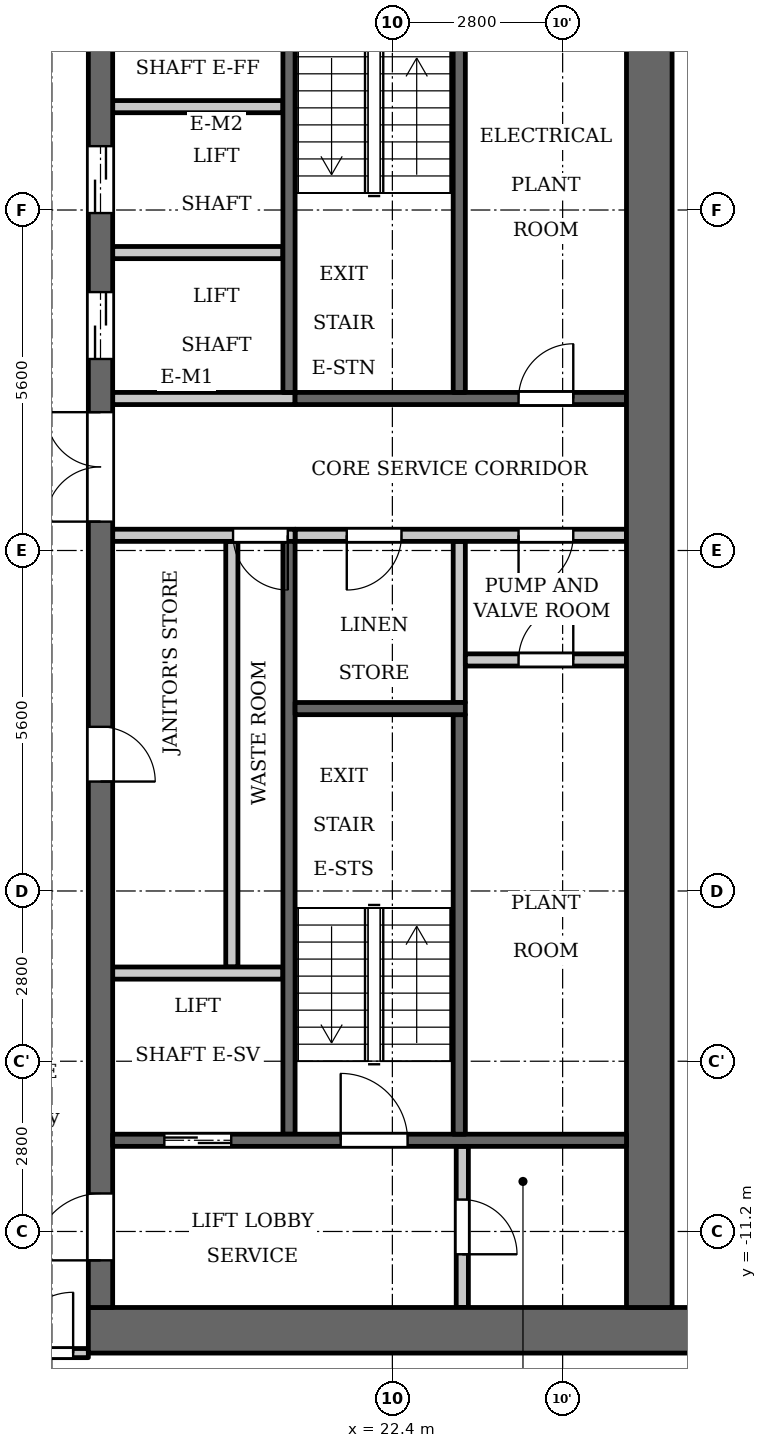
"""IFC4 building model, lengths in metres.
Left out: names, types, materials, properties, quantities, classifications, styles, units other than length and angle.
Written with IfcOpenShell. Run it as: python <this file> out.ifc"""

import sys

from ifc_helpers import new_model, si_unit, direction, frame, frame_2d, origin, place, context, subcontext, project, spatial, rectangle, extrude, element, fill, save


model = new_model("IFC4")
c1 = context("Model", 3, precision=1e-05, world=origin(), true_north=direction((0.0, 1.0)))
c2 = subcontext(c1, "Body", "Model", "MODEL_VIEW")
j1 = project(units=[si_unit("LENGTHUNIT", "METRE"), si_unit("PLANEANGLEUNIT", "RADIAN")], contexts=[c1])
p1 = place(None, origin())
s1 = spatial("IfcSite", under=j1, at=p1, CompositionType="ELEMENT")
p2 = place(p1, origin())
s2 = spatial("IfcBuilding", under=s1, at=p2, CompositionType="ELEMENT")
p3 = place(p2, frame((0.0, 0.0, 174.6)))
s3 = spatial("IfcBuildingStorey", under=s2, at=p3, CompositionType="ELEMENT", Elevation=174.6)
p4 = place(p3, frame((23.5, -2.5, 0.0), z_axis=(0.0, 0.0, 1.0), x_axis=(0.0, 1.0, 0.0)))
e1 = element("IfcWall", 1, at=p4, inside=s3, PredefinedType="PARTITIONING", context=c2, shape_type="SweptSolid", body=[
    extrude(rectangle(XDim=2.65, YDim=0.2, at=frame_2d((1.325, 0.0))), origin(), (0.0, 0.0, 1.0), 3.15),
])
p5 = place(p3, frame((20.7, 2.6, 0.0), z_axis=(0.0, 0.0, 1.0), x_axis=(0.0, 1.0, 0.0)))
e2 = element("IfcWall", 2, at=p5, inside=s3, PredefinedType="SHEAR", context=c2, shape_type="SweptSolid", body=[
    extrude(rectangle(XDim=7.0, YDim=0.2, at=frame_2d((3.5, 0.0))), origin(), (0.0, 0.0, 1.0), 3.15),
])
p6 = place(p3, frame((20.7, -9.6, 0.0), z_axis=(0.0, 0.0, 1.0), x_axis=(0.0, 1.0, 0.0)))
e3 = element("IfcWall", 3, at=p6, inside=s3, PredefinedType="SHEAR", context=c2, shape_type="SweptSolid", body=[
    extrude(rectangle(XDim=9.75, YDim=0.2, at=frame_2d((4.875, 0.0))), origin(), (0.0, 0.0, 1.0), 3.15),
])
p7 = place(p3, frame((20.8, 2.5, 0.0), z_axis=(0.0, 0.0, 1.0), x_axis=(1.0, 0.0, 0.0)))
e4 = element("IfcWall", 4, at=p7, inside=s3, PredefinedType="SHEAR", context=c2, shape_type="SweptSolid", body=[
    extrude(rectangle(XDim=5.45, YDim=0.2, at=frame_2d((2.725, 0.0))), origin(), (0.0, 0.0, 1.0), 3.15),
])
p8 = place(p7, frame((3.675, 0.0, 0.0)))
e5 = element("IfcOpeningElement", 5, at=p8, cuts=e4, PredefinedType="OPENING", context=c2, shape_type="SweptSolid", body=[
    extrude(rectangle(XDim=0.9, YDim=2.1, at=frame_2d((0.45, 1.05))), frame((0.0, 0.11, 0.0), z_axis=(0.0, -1.0, 0.0), x_axis=(1.0, 0.0, 0.0)), (0.0, 0.0, 1.0), 0.22),
])
p9 = place(p3, frame((20.8, 0.25, 0.0), z_axis=(0.0, 0.0, 1.0), x_axis=(1.0, 0.0, 0.0)))
e6 = element("IfcWall", 6, at=p9, inside=s3, PredefinedType="PARTITIONING", context=c2, shape_type="SweptSolid", body=[
    extrude(rectangle(XDim=5.45, YDim=0.2, at=frame_2d((2.725, 0.0))), origin(), (0.0, 0.0, 1.0), 3.15),
])
p10 = place(p9, frame((0.85, 0.0, 0.0)))
e7 = element("IfcOpeningElement", 7, at=p10, cuts=e6, PredefinedType="OPENING", context=c2, shape_type="SweptSolid", body=[
    extrude(rectangle(XDim=0.9, YDim=2.1, at=frame_2d((0.45, 1.05))), frame((0.0, 0.11, 0.0), z_axis=(0.0, -1.0, 0.0), x_axis=(1.0, 0.0, 0.0)), (0.0, 0.0, 1.0), 0.22),
])
p11 = place(p9, frame((3.675, 0.0, 0.0)))
e8 = element("IfcOpeningElement", 8, at=p11, cuts=e6, PredefinedType="OPENING", context=c2, shape_type="SweptSolid", body=[
    extrude(rectangle(XDim=0.9, YDim=2.1, at=frame_2d((0.45, 1.05))), frame((0.0, 0.11, 0.0), z_axis=(0.0, -1.0, 0.0), x_axis=(1.0, 0.0, 0.0)), (0.0, 0.0, 1.0), 0.22),
])
p12 = place(p3, frame((17.4, -12.825, 0.0), z_axis=(0.0, 0.0, 1.0), x_axis=(1.0, 0.0, 0.0)))
e9 = element("IfcWall", 9, at=p12, inside=s3, PredefinedType="SHEAR", context=c2, shape_type="SweptSolid", body=[
    extrude(rectangle(XDim=10.4, YDim=0.75, at=frame_2d((5.2, 0.0))), origin(), (0.0, 0.0, 1.0), 3.15),
])
p13 = place(p3, frame((19.76, -6.85, 0.0), z_axis=(0.0, 0.0, 1.0), x_axis=(0.0, 1.0, 0.0)))
e10 = element("IfcWall", 10, at=p13, inside=s3, PredefinedType="PARTITIONING", context=c2, shape_type="SweptSolid", body=[
    extrude(rectangle(XDim=7.0, YDim=0.2, at=frame_2d((3.5, 0.0))), origin(), (0.0, 0.0, 1.0), 3.15),
])
p14 = place(p3, frame((17.6, -12.45, 0.0), z_axis=(0.0, 0.0, 1.0), x_axis=(0.0, 1.0, 0.0)))
e11 = element("IfcWall", 11, at=p14, inside=s3, PredefinedType="SHEAR", context=c2, shape_type="SweptSolid", body=[
    extrude(rectangle(XDim=24.9, YDim=0.4, at=frame_2d((12.45, 0.0))), origin(), (0.0, 0.0, 1.0), 3.15),
])
p15 = place(p14, frame((8.65, 0.0, 0.0)))
e12 = element("IfcOpeningElement", 12, at=p15, cuts=e11, PredefinedType="OPENING", context=c2, shape_type="SweptSolid", body=[
    extrude(rectangle(XDim=0.9, YDim=2.1, at=frame_2d((0.45, 1.05))), frame((0.0, 0.21, 0.0), z_axis=(0.0, -1.0, 0.0), x_axis=(1.0, 0.0, 0.0)), (0.0, 0.0, 1.0), 0.42),
])
p16 = place(p14, frame((15.6, 0.0, 0.0)))
e13 = element("IfcOpeningElement", 13, at=p16, cuts=e11, PredefinedType="OPENING", context=c2, shape_type="SweptSolid", body=[
    extrude(rectangle(XDim=1.1, YDim=2.1, at=frame_2d((0.55, 1.05))), frame((0.0, 0.21, 0.0), z_axis=(0.0, -1.0, 0.0), x_axis=(1.0, 0.0, 0.0)), (0.0, 0.0, 1.0), 0.42),
])
p17 = place(p14, frame((18.0, 0.0, 0.0)))
e14 = element("IfcOpeningElement", 14, at=p17, cuts=e11, PredefinedType="OPENING", context=c2, shape_type="SweptSolid", body=[
    extrude(rectangle(XDim=1.1, YDim=2.1, at=frame_2d((0.55, 1.05))), frame((0.0, 0.21, 0.0), z_axis=(0.0, -1.0, 0.0), x_axis=(1.0, 0.0, 0.0)), (0.0, 0.0, 1.0), 0.42),
])
p18 = place(p14, frame((23.025, 0.0, 0.0)))
e15 = element("IfcOpeningElement", 15, at=p18, cuts=e11, PredefinedType="OPENING", context=c2, shape_type="SweptSolid", body=[
    extrude(rectangle(XDim=1.1, YDim=2.1, at=frame_2d((0.55, 1.05))), frame((0.0, 0.21, 0.0), z_axis=(0.0, -1.0, 0.0), x_axis=(1.0, 0.0, 0.0)), (0.0, 0.0, 1.0), 0.42),
])
p19 = place(p14, frame((0.775, 0.0, 0.0)))
e16 = element("IfcOpeningElement", 16, at=p19, cuts=e11, PredefinedType="OPENING", context=c2, shape_type="SweptSolid", body=[
    extrude(rectangle(XDim=1.1, YDim=2.1, at=frame_2d((0.55, 1.05))), frame((0.0, 0.21, 0.0), z_axis=(0.0, -1.0, 0.0), x_axis=(1.0, 0.0, 0.0)), (0.0, 0.0, 1.0), 0.42),
])
p20 = place(p14, frame((12.925, 0.0, 0.0)))
e17 = element("IfcOpeningElement", 17, at=p20, cuts=e11, PredefinedType="OPENING", context=c2, shape_type="SweptSolid", body=[
    extrude(rectangle(XDim=1.8, YDim=2.1, at=frame_2d((0.9, 1.05))), frame((0.0, 0.21, 0.0), z_axis=(0.0, -1.0, 0.0), x_axis=(1.0, 0.0, 0.0)), (0.0, 0.0, 1.0), 0.42),
])
p21 = place(p3, frame((26.625, -12.45, 0.0), z_axis=(0.0, 0.0, 1.0), x_axis=(0.0, 1.0, 0.0)))
e18 = element("IfcWall", 18, at=p21, inside=s3, PredefinedType="SHEAR", context=c2, shape_type="SweptSolid", body=[
    extrude(rectangle(XDim=24.9, YDim=0.75, at=frame_2d((12.45, 0.0))), origin(), (0.0, 0.0, 1.0), 3.15),
])
p22 = place(p3, frame((23.55, -12.45, 0.0), z_axis=(0.0, 0.0, 1.0), x_axis=(0.0, 1.0, 0.0)))
e19 = element("IfcWall", 19, at=p22, inside=s3, PredefinedType="PARTITIONING", context=c2, shape_type="SweptSolid", body=[
    extrude(rectangle(XDim=2.65, YDim=0.2, at=frame_2d((1.325, 0.0))), origin(), (0.0, 0.0, 1.0), 3.15),
])
p23 = place(p22, frame((0.875, 0.0, 0.0)))
e20 = element("IfcOpeningElement", 20, at=p23, cuts=e19, PredefinedType="OPENING", context=c2, shape_type="SweptSolid", body=[
    extrude(rectangle(XDim=0.9, YDim=2.1, at=frame_2d((0.45, 1.05))), frame((0.0, 0.11, 0.0), z_axis=(0.0, -1.0, 0.0), x_axis=(1.0, 0.0, 0.0)), (0.0, 0.0, 1.0), 0.22),
])
p24 = place(p3, frame((23.6, -1.8, 0.0), z_axis=(0.0, 0.0, 1.0), x_axis=(1.0, 0.0, 0.0)))
e21 = element("IfcWall", 21, at=p24, inside=s3, PredefinedType="PARTITIONING", context=c2, shape_type="SweptSolid", body=[
    extrude(rectangle(XDim=2.65, YDim=0.2, at=frame_2d((1.325, 0.0))), origin(), (0.0, 0.0, 1.0), 3.15),
])
p25 = place(p24, frame((0.875, 0.0, 0.0)))
e22 = element("IfcOpeningElement", 22, at=p25, cuts=e21, PredefinedType="OPENING", context=c2, shape_type="SweptSolid", body=[
    extrude(rectangle(XDim=0.9, YDim=2.1, at=frame_2d((0.45, 1.05))), frame((0.0, 0.11, 0.0), z_axis=(0.0, -1.0, 0.0), x_axis=(1.0, 0.0, 0.0)), (0.0, 0.0, 1.0), 0.22),
])
p26 = place(p3, frame((17.8, -9.7, 0.0), z_axis=(0.0, 0.0, 1.0), x_axis=(1.0, 0.0, 0.0)))
e23 = element("IfcWall", 23, at=p26, inside=s3, PredefinedType="SHEAR", context=c2, shape_type="SweptSolid", body=[
    extrude(rectangle(XDim=8.45, YDim=0.2, at=frame_2d((4.225, 0.0))), origin(), (0.0, 0.0, 1.0), 3.15),
])
p27 = place(p26, frame((0.85, 0.0, 0.0)))
e24 = element("IfcOpeningElement", 24, at=p27, cuts=e23, PredefinedType="OPENING", context=c2, shape_type="SweptSolid", body=[
    extrude(rectangle(XDim=1.1, YDim=2.1, at=frame_2d((0.55, 1.05))), frame((0.0, 0.11, 0.0), z_axis=(0.0, -1.0, 0.0), x_axis=(1.0, 0.0, 0.0)), (0.0, 0.0, 1.0), 0.22),
])
p28 = place(p26, frame((3.75, 0.0, 0.0)))
e25 = element("IfcOpeningElement", 25, at=p28, cuts=e23, PredefinedType="OPENING", context=c2, shape_type="SweptSolid", body=[
    extrude(rectangle(XDim=1.1, YDim=2.1, at=frame_2d((0.55, 1.05))), frame((0.0, 0.11, 0.0), z_axis=(0.0, -1.0, 0.0), x_axis=(1.0, 0.0, 0.0)), (0.0, 0.0, 1.0), 0.22),
])
p29 = place(p3, frame((17.8, -6.95, 0.0), z_axis=(0.0, 0.0, 1.0), x_axis=(1.0, 0.0, 0.0)))
e26 = element("IfcWall", 26, at=p29, inside=s3, PredefinedType="PARTITIONING", context=c2, shape_type="SweptSolid", body=[
    extrude(rectangle(XDim=2.8, YDim=0.2, at=frame_2d((1.4, 0.0))), origin(), (0.0, 0.0, 1.0), 3.15),
])
p30 = place(p3, frame((17.8, 0.25, 0.0), z_axis=(0.0, 0.0, 1.0), x_axis=(1.0, 0.0, 0.0)))
e27 = element("IfcWall", 27, at=p30, inside=s3, PredefinedType="PARTITIONING", context=c2, shape_type="SweptSolid", body=[
    extrude(rectangle(XDim=3.0, YDim=0.2, at=frame_2d((1.5, 0.0))), origin(), (0.0, 0.0, 1.0), 3.15),
])
p31 = place(p30, frame((1.98, 0.0, 0.0)))
e28 = element("IfcOpeningElement", 28, at=p31, cuts=e27, PredefinedType="OPENING", context=c2, shape_type="SweptSolid", body=[
    extrude(rectangle(XDim=0.9, YDim=2.1, at=frame_2d((0.45, 1.05))), frame((0.0, 0.11, 0.0), z_axis=(0.0, -1.0, 0.0), x_axis=(1.0, 0.0, 0.0)), (0.0, 0.0, 1.0), 0.22),
])
p32 = place(p3, frame((17.8, 2.5, 0.0), z_axis=(0.0, 0.0, 1.0), x_axis=(1.0, 0.0, 0.0)))
e29 = element("IfcWall", 29, at=p32, inside=s3, PredefinedType="PARTITIONING", context=c2, shape_type="SweptSolid", body=[
    extrude(rectangle(XDim=3.0, YDim=0.2, at=frame_2d((1.5, 0.0))), origin(), (0.0, 0.0, 1.0), 3.15),
])
for number, where, z_axis, x_axis in (
    (30, (17.8, 4.9, 0.0), (0.0, 0.0, 1.0), (1.0, 0.0, 0.0)),
    (31, (17.8, 7.3, 0.0), (0.0, 0.0, 1.0), (1.0, 0.0, 0.0)),
):
    element("IfcWall", number, at=place(p3, frame(where, z_axis=z_axis, x_axis=x_axis)), inside=s3, PredefinedType="PARTITIONING", context=c2, shape_type="SweptSolid", body=[
        extrude(rectangle(XDim=2.8, YDim=0.2, at=frame_2d((1.4, 0.0))), origin(), (0.0, 0.0, 1.0), 3.15),
    ])
p33 = place(p3, frame((23.5, 2.6, 0.0), z_axis=(0.0, 0.0, 1.0), x_axis=(0.0, 1.0, 0.0)))
e32 = element("IfcWall", 32, at=p33, inside=s3, PredefinedType="SHEAR", context=c2, shape_type="SweptSolid", body=[
    extrude(rectangle(XDim=7.0, YDim=0.2, at=frame_2d((3.5, 0.0))), origin(), (0.0, 0.0, 1.0), 3.15),
])
p34 = place(p3, frame((23.5, -9.6, 0.0), z_axis=(0.0, 0.0, 1.0), x_axis=(0.0, 1.0, 0.0)))
e33 = element("IfcWall", 33, at=p34, inside=s3, PredefinedType="SHEAR", context=c2, shape_type="SweptSolid", body=[
    extrude(rectangle(XDim=6.9, YDim=0.2, at=frame_2d((3.45, 0.0))), origin(), (0.0, 0.0, 1.0), 3.15),
])
p35 = place(p3, frame((20.8, -2.6, 0.0), z_axis=(0.0, 0.0, 1.0), x_axis=(1.0, 0.0, 0.0)))
e34 = element("IfcWall", 34, at=p35, inside=s3, PredefinedType="SHEAR", context=c2, shape_type="SweptSolid", body=[
    extrude(rectangle(XDim=2.8, YDim=0.2, at=frame_2d((1.4, 0.0))), origin(), (0.0, 0.0, 1.0), 3.15),
])
p36 = place(p3, frame((-17.4, -13.2, 0.0), z_axis=(0.0, 0.0, 1.0), x_axis=(1.0, 0.0, 0.0)))
e35 = element("IfcWall", 35, at=p36, inside=s3, PredefinedType="PARTITIONING", context=c2, shape_type="SweptSolid", body=[
    extrude(rectangle(XDim=34.8, YDim=0.15, at=frame_2d((17.4, 0.0))), origin(), (0.0, 0.0, 1.0), 3.15),
])
p37 = place(p36, frame((0.15, 0.0, 0.0)))
e36 = element("IfcOpeningElement", 36, at=p37, cuts=e35, PredefinedType="OPENING", context=c2, shape_type="SweptSolid", body=[
    extrude(rectangle(XDim=1.0, YDim=2.1, at=frame_2d((0.5, 1.05))), frame((0.0, 0.085, 0.0), z_axis=(0.0, -1.0, 0.0), x_axis=(1.0, 0.0, 0.0)), (0.0, 0.0, 1.0), 0.17),
])
p38 = place(p36, frame((33.55, 0.0, 0.0)))
e37 = element("IfcOpeningElement", 37, at=p38, cuts=e35, PredefinedType="OPENING", context=c2, shape_type="SweptSolid", body=[
    extrude(rectangle(XDim=1.0, YDim=2.1, at=frame_2d((0.5, 1.05))), frame((0.0, 0.085, 0.0), z_axis=(0.0, -1.0, 0.0), x_axis=(1.0, 0.0, 0.0)), (0.0, 0.0, 1.0), 0.17),
])
p39 = place(p36, frame((15.7, 0.0, 0.0)))
e38 = element("IfcOpeningElement", 38, at=p39, cuts=e35, PredefinedType="OPENING", context=c2, shape_type="SweptSolid", body=[
    extrude(rectangle(XDim=1.0, YDim=2.1, at=frame_2d((0.5, 1.05))), frame((0.0, 0.085, 0.0), z_axis=(0.0, -1.0, 0.0), x_axis=(1.0, 0.0, 0.0)), (0.0, 0.0, 1.0), 0.17),
])
p40 = place(p36, frame((26.9, 0.0, 0.0)))
e39 = element("IfcOpeningElement", 39, at=p40, cuts=e35, PredefinedType="OPENING", context=c2, shape_type="SweptSolid", body=[
    extrude(rectangle(XDim=1.0, YDim=2.1, at=frame_2d((0.5, 1.05))), frame((0.0, 0.085, 0.0), z_axis=(0.0, -1.0, 0.0), x_axis=(1.0, 0.0, 0.0)), (0.0, 0.0, 1.0), 0.17),
])
p41 = place(p27, origin())
e40 = element("IfcDoor", 40, at=p41, inside=s3, OperationType="DOUBLE_DOOR_SLIDING", PredefinedType="DOOR", context=c2, shape_type="SweptSolid", body=[
    extrude(rectangle(XDim=1.1, YDim=2.1, at=frame_2d((0.55, 1.05))), frame((0.0, 0.025, 0.0), z_axis=(0.0, -1.0, 0.0), x_axis=(1.0, 0.0, 0.0)), (0.0, 0.0, 1.0), 0.05),
])
fill(e24, e40)
p42 = place(p15, origin())
e41 = element("IfcDoor", 41, at=p42, inside=s3, OperationType="SINGLE_SWING_LEFT", PredefinedType="DOOR", context=c2, shape_type="SweptSolid", body=[
    extrude(rectangle(XDim=0.9, YDim=2.1, at=frame_2d((0.45, 1.05))), frame((0.0, 0.025, 0.0), z_axis=(0.0, -1.0, 0.0), x_axis=(1.0, 0.0, 0.0)), (0.0, 0.0, 1.0), 0.05),
])
fill(e12, e41)
p43 = place(p31, origin())
e42 = element("IfcDoor", 42, at=p43, inside=s3, OperationType="SINGLE_SWING_RIGHT", PredefinedType="DOOR", context=c2, shape_type="SweptSolid", body=[
    extrude(rectangle(XDim=0.9, YDim=2.1, at=frame_2d((0.45, 1.05))), frame((0.0, 0.025, 0.0), z_axis=(0.0, -1.0, 0.0), x_axis=(1.0, 0.0, 0.0)), (0.0, 0.0, 1.0), 0.05),
])
fill(e28, e42)
p44 = place(p16, origin())
e43 = element("IfcDoor", 43, at=p44, inside=s3, OperationType="DOUBLE_DOOR_SLIDING", PredefinedType="DOOR", context=c2, shape_type="SweptSolid", body=[
    extrude(rectangle(XDim=1.1, YDim=2.1, at=frame_2d((0.55, 1.05))), frame((0.0, 0.025, 0.0), z_axis=(0.0, -1.0, 0.0), x_axis=(1.0, 0.0, 0.0)), (0.0, 0.0, 1.0), 0.05),
])
fill(e13, e43)
p45 = place(p17, origin())
e44 = element("IfcDoor", 44, at=p45, inside=s3, OperationType="DOUBLE_DOOR_SLIDING", PredefinedType="DOOR", context=c2, shape_type="SweptSolid", body=[
    extrude(rectangle(XDim=1.1, YDim=2.1, at=frame_2d((0.55, 1.05))), frame((0.0, 0.025, 0.0), z_axis=(0.0, -1.0, 0.0), x_axis=(1.0, 0.0, 0.0)), (0.0, 0.0, 1.0), 0.05),
])
fill(e14, e44)
p46 = place(p19, origin())
e45 = element("IfcDoor", 45, at=p46, inside=s3, OperationType="SINGLE_SWING_RIGHT", PredefinedType="DOOR", context=c2, shape_type="SweptSolid", body=[
    extrude(rectangle(XDim=1.1, YDim=2.1, at=frame_2d((0.55, 1.05))), frame((0.0, 0.025, 0.0), z_axis=(0.0, -1.0, 0.0), x_axis=(1.0, 0.0, 0.0)), (0.0, 0.0, 1.0), 0.05),
])
fill(e16, e45)
p47 = place(p23, origin())
e46 = element("IfcDoor", 46, at=p47, inside=s3, OperationType="SINGLE_SWING_LEFT", PredefinedType="DOOR", context=c2, shape_type="SweptSolid", body=[
    extrude(rectangle(XDim=0.9, YDim=2.1, at=frame_2d((0.45, 1.05))), frame((0.0, 0.025, 0.0), z_axis=(0.0, -1.0, 0.0), x_axis=(1.0, 0.0, 0.0)), (0.0, 0.0, 1.0), 0.05),
])
fill(e20, e46)
p48 = place(p28, origin())
e47 = element("IfcDoor", 47, at=p48, inside=s3, OperationType="SINGLE_SWING_RIGHT", PredefinedType="DOOR", context=c2, shape_type="SweptSolid", body=[
    extrude(rectangle(XDim=1.1, YDim=2.1, at=frame_2d((0.55, 1.05))), frame((0.0, 0.025, 0.0), z_axis=(0.0, -1.0, 0.0), x_axis=(1.0, 0.0, 0.0)), (0.0, 0.0, 1.0), 0.05),
])
fill(e25, e47)
p49 = place(p20, origin())
e48 = element("IfcDoor", 48, at=p49, inside=s3, OperationType="DOUBLE_DOOR_SINGLE_SWING", PredefinedType="DOOR", context=c2, shape_type="SweptSolid", body=[
    extrude(rectangle(XDim=1.8, YDim=2.1, at=frame_2d((0.9, 1.05))), frame((0.0, 0.025, 0.0), z_axis=(0.0, -1.0, 0.0), x_axis=(1.0, 0.0, 0.0)), (0.0, 0.0, 1.0), 0.05),
])
fill(e17, e48)
p50 = place(p10, origin())
e49 = element("IfcDoor", 49, at=p50, inside=s3, OperationType="SINGLE_SWING_LEFT", PredefinedType="DOOR", context=c2, shape_type="SweptSolid", body=[
    extrude(rectangle(XDim=0.9, YDim=2.1, at=frame_2d((0.45, 1.05))), frame((0.0, 0.025, 0.0), z_axis=(0.0, -1.0, 0.0), x_axis=(1.0, 0.0, 0.0)), (0.0, 0.0, 1.0), 0.05),
])
fill(e7, e49)
p51 = place(p25, origin())
e50 = element("IfcDoor", 50, at=p51, inside=s3, OperationType="SINGLE_SWING_LEFT", PredefinedType="DOOR", context=c2, shape_type="SweptSolid", body=[
    extrude(rectangle(XDim=0.9, YDim=2.1, at=frame_2d((0.45, 1.05))), frame((0.0, 0.025, 0.0), z_axis=(0.0, -1.0, 0.0), x_axis=(1.0, 0.0, 0.0)), (0.0, 0.0, 1.0), 0.05),
])
fill(e22, e50)
p52 = place(p11, origin())
e51 = element("IfcDoor", 51, at=p52, inside=s3, OperationType="SINGLE_SWING_LEFT", PredefinedType="DOOR", context=c2, shape_type="SweptSolid", body=[
    extrude(rectangle(XDim=0.9, YDim=2.1, at=frame_2d((0.45, 1.05))), frame((0.0, 0.025, 0.0), z_axis=(0.0, -1.0, 0.0), x_axis=(1.0, 0.0, 0.0)), (0.0, 0.0, 1.0), 0.05),
])
fill(e8, e51)
p53 = place(p8, origin())
e52 = element("IfcDoor", 52, at=p53, inside=s3, OperationType="SINGLE_SWING_LEFT", PredefinedType="DOOR", context=c2, shape_type="SweptSolid", body=[
    extrude(rectangle(XDim=0.9, YDim=2.1, at=frame_2d((0.45, 1.05))), frame((0.0, 0.025, 0.0), z_axis=(0.0, -1.0, 0.0), x_axis=(1.0, 0.0, 0.0)), (0.0, 0.0, 1.0), 0.05),
])
fill(e5, e52)
p54 = place(p38, origin())
e53 = element("IfcDoor", 53, at=p54, inside=s3, OperationType="SINGLE_SWING_LEFT", PredefinedType="DOOR", context=c2, shape_type="SweptSolid", body=[
    extrude(rectangle(XDim=1.0, YDim=2.1, at=frame_2d((0.5, 1.05))), frame((0.0, 0.025, 0.0), z_axis=(0.0, -1.0, 0.0), x_axis=(1.0, 0.0, 0.0)), (0.0, 0.0, 1.0), 0.05),
])
fill(e37, e53)
save(model, sys.argv[1])
